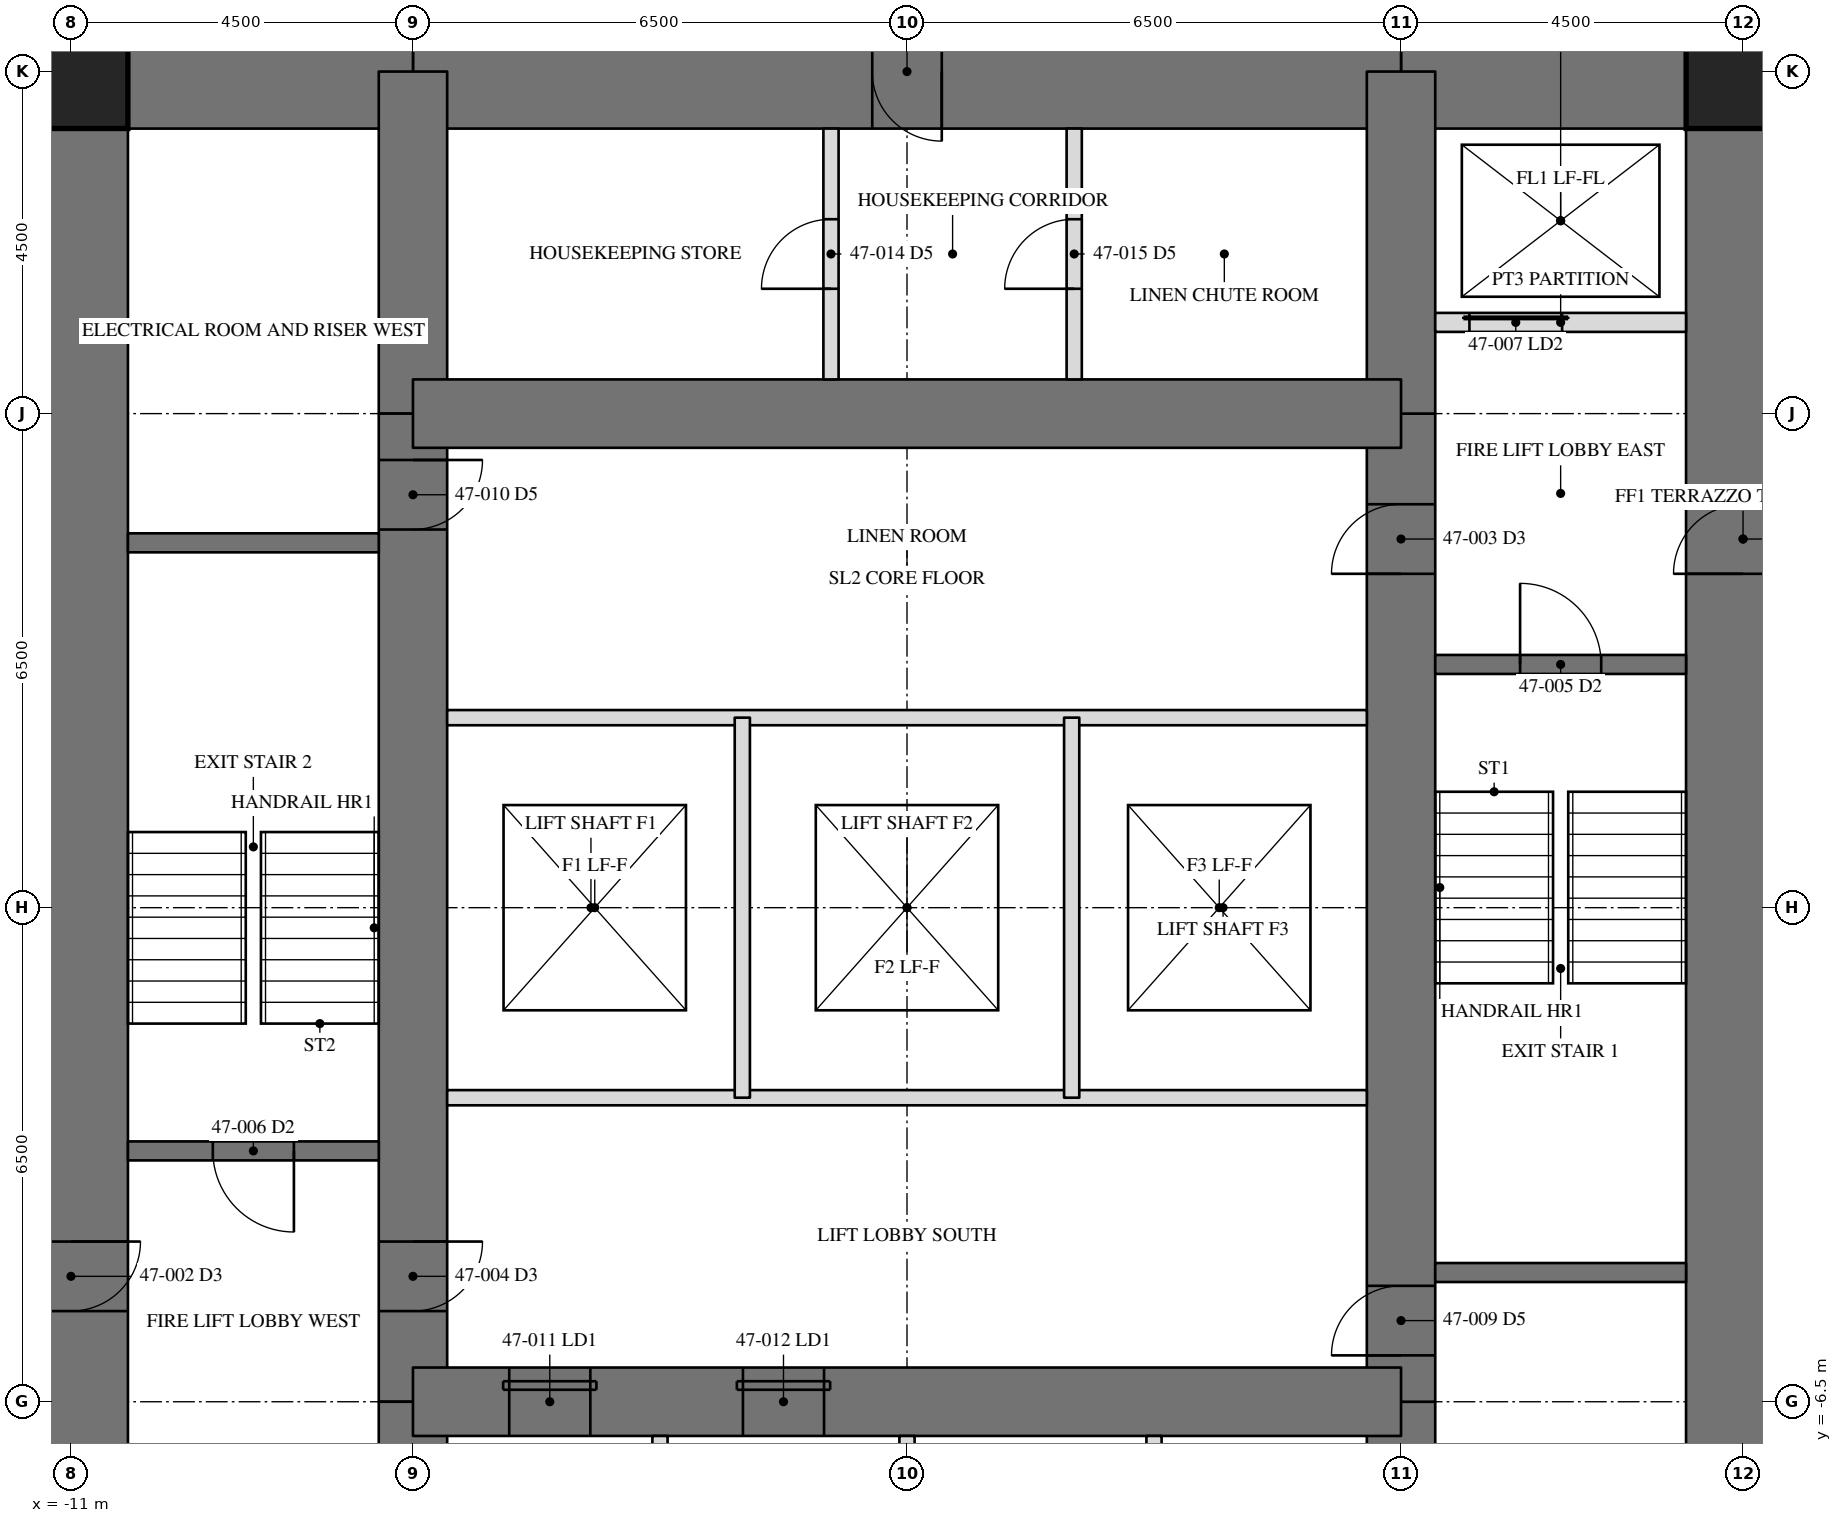
"""IFC4 building model, lengths in metres.
Left out: names, types, materials, properties, quantities, classifications, styles, units other than length and angle.
Written with IfcOpenShell. Run it as: python <this file> out.ifc"""

import sys

from ifc_helpers import new_model, si_unit, direction, frame, frame_2d, origin, origin_2d, place, context, subcontext, project, spatial, rectangle, hollow_rectangle, extrude, element, fill, save


model = new_model("IFC4")
c1 = context("Model", 3, precision=1e-05, world=origin(), true_north=direction((0.0, 1.0)))
c2 = subcontext(c1, "Body", "Model", "MODEL_VIEW")
j1 = project(units=[si_unit("LENGTHUNIT", "METRE"), si_unit("PLANEANGLEUNIT", "RADIAN")], contexts=[c1])
p1 = place(None, origin())
s1 = spatial("IfcSite", under=j1, at=p1, CompositionType="ELEMENT")
p2 = place(p1, origin())
s2 = spatial("IfcBuilding", under=s1, at=p2, CompositionType="ELEMENT")
p3 = place(p2, frame((0.0, 0.0, 201.2)))
s3 = spatial("IfcBuildingStorey", under=s2, at=p3, CompositionType="ELEMENT", Elevation=201.2)
p4 = place(p3, frame((11.0, -11.0, 0.0), z_axis=(0.0, 0.0, 1.0), x_axis=(0.0, 1.0, 0.0)))
e1 = element("IfcWall", 1, at=p4, inside=s3, PredefinedType="SHEAR", context=c2, shape_type="SweptSolid", body=[
    extrude(rectangle(XDim=22.0, YDim=1.5, at=frame_2d((11.0, 0.0))), origin(), (0.0, 0.0, 1.0), 3.5),
])
p5 = place(p4, frame((15.393, 0.0, 0.0)))
e2 = element("IfcOpeningElement", 2, at=p5, cuts=e1, PredefinedType="OPENING", context=c2, shape_type="SweptSolid", body=[
    extrude(rectangle(XDim=0.915, YDim=2.134, at=frame_2d((0.458, 1.067))), frame((0.0, 0.76, 0.0), z_axis=(0.0, -1.0, 0.0), x_axis=(1.0, 0.0, 0.0)), (0.0, 0.0, 1.0), 1.52),
])
p6 = place(p3, frame((-11.0, 11.0, 0.0), z_axis=(0.0, 0.0, 1.0), x_axis=(0.0, -1.0, 0.0)))
e3 = element("IfcWall", 3, at=p6, inside=s3, PredefinedType="SHEAR", context=c2, shape_type="SweptSolid", body=[
    extrude(rectangle(XDim=22.0, YDim=1.5, at=frame_2d((11.0, 0.0))), origin(), (0.0, 0.0, 1.0), 3.5),
])
p7 = place(p6, frame((15.393, 0.0, 0.0)))
e4 = element("IfcOpeningElement", 4, at=p7, cuts=e3, PredefinedType="OPENING", context=c2, shape_type="SweptSolid", body=[
    extrude(rectangle(XDim=0.915, YDim=2.134, at=frame_2d((0.458, 1.067))), frame((0.0, 0.76, 0.0), z_axis=(0.0, -1.0, 0.0), x_axis=(1.0, 0.0, 0.0)), (0.0, 0.0, 1.0), 1.52),
])
p8 = place(p3, frame((11.0, 11.0, 0.0), z_axis=(0.0, 0.0, 1.0), x_axis=(-1.0, 0.0, 0.0)))
e5 = element("IfcWall", 5, at=p8, inside=s3, PredefinedType="SHEAR", context=c2, shape_type="SweptSolid", body=[
    extrude(rectangle(XDim=4.5, YDim=1.5, at=frame_2d((2.25, 0.0))), origin(), (0.0, 0.0, 1.0), 3.5),
])
p9 = place(p3, frame((6.5, 11.0, 0.0), z_axis=(0.0, 0.0, 1.0), x_axis=(-1.0, 0.0, 0.0)))
e6 = element("IfcWall", 6, at=p9, inside=s3, PredefinedType="SHEAR", context=c2, shape_type="SweptSolid", body=[
    extrude(rectangle(XDim=13.0, YDim=1.5, at=frame_2d((6.5, 0.0))), origin(), (0.0, 0.0, 1.0), 3.5),
])
p10 = place(p9, frame((6.042, 0.0, 0.0)))
e7 = element("IfcOpeningElement", 7, at=p10, cuts=e6, PredefinedType="OPENING", context=c2, shape_type="SweptSolid", body=[
    extrude(rectangle(XDim=0.915, YDim=2.134, at=frame_2d((0.458, 1.067))), frame((0.0, 0.76, 0.0), z_axis=(0.0, -1.0, 0.0), x_axis=(1.0, 0.0, 0.0)), (0.0, 0.0, 1.0), 1.52),
])
p11 = place(p3, frame((-6.5, 11.0, 0.0), z_axis=(0.0, 0.0, 1.0), x_axis=(-1.0, 0.0, 0.0)))
e8 = element("IfcWall", 8, at=p11, inside=s3, PredefinedType="SHEAR", context=c2, shape_type="SweptSolid", body=[
    extrude(rectangle(XDim=4.5, YDim=1.5, at=frame_2d((2.25, 0.0))), origin(), (0.0, 0.0, 1.0), 3.5),
])
p12 = place(p3, frame((6.5, -11.0, 0.0), z_axis=(0.0, 0.0, 1.0), x_axis=(0.0, 1.0, 0.0)))
e9 = element("IfcWall", 9, at=p12, inside=s3, PredefinedType="SHEAR", context=c2, shape_type="SweptSolid", body=[
    extrude(rectangle(XDim=4.5, YDim=0.9, at=frame_2d((2.25, 0.0))), origin(), (0.0, 0.0, 1.0), 3.5),
])
p13 = place(p3, frame((6.5, -6.5, 0.0), z_axis=(0.0, 0.0, 1.0), x_axis=(0.0, 1.0, 0.0)))
e10 = element("IfcWall", 10, at=p13, inside=s3, PredefinedType="SHEAR", context=c2, shape_type="SweptSolid", body=[
    extrude(rectangle(XDim=13.0, YDim=0.9, at=frame_2d((6.5, 0.0))), origin(), (0.0, 0.0, 1.0), 3.5),
])
p14 = place(p13, frame((10.893, 0.0, 0.0)))
e11 = element("IfcOpeningElement", 11, at=p14, cuts=e10, PredefinedType="OPENING", context=c2, shape_type="SweptSolid", body=[
    extrude(rectangle(XDim=0.915, YDim=2.134, at=frame_2d((0.458, 1.067))), frame((0.0, 0.46, 0.0), z_axis=(0.0, -1.0, 0.0), x_axis=(1.0, 0.0, 0.0)), (0.0, 0.0, 1.0), 0.92),
])
p15 = place(p13, frame((0.61, 0.0, 0.0)))
e12 = element("IfcOpeningElement", 12, at=p15, cuts=e10, PredefinedType="OPENING", context=c2, shape_type="SweptSolid", body=[
    extrude(rectangle(XDim=0.915, YDim=2.134, at=frame_2d((0.458, 1.067))), frame((0.0, 0.46, 0.0), z_axis=(0.0, -1.0, 0.0), x_axis=(1.0, 0.0, 0.0)), (0.0, 0.0, 1.0), 0.92),
])
for number, where, z_axis, x_axis in (
    (13, (6.5, 6.5, 0.0), (0.0, 0.0, 1.0), (0.0, 1.0, 0.0)),
    (14, (-6.5, 11.0, 0.0), (0.0, 0.0, 1.0), (0.0, -1.0, 0.0)),
):
    element("IfcWall", number, at=place(p3, frame(where, z_axis=z_axis, x_axis=x_axis)), inside=s3, PredefinedType="SHEAR", context=c2, shape_type="SweptSolid", body=[
        extrude(rectangle(XDim=4.5, YDim=0.9, at=frame_2d((2.25, 0.0))), origin(), (0.0, 0.0, 1.0), 3.5),
    ])
p16 = place(p3, frame((-6.5, 6.5, 0.0), z_axis=(0.0, 0.0, 1.0), x_axis=(0.0, -1.0, 0.0)))
e15 = element("IfcWall", 15, at=p16, inside=s3, PredefinedType="SHEAR", context=c2, shape_type="SweptSolid", body=[
    extrude(rectangle(XDim=13.0, YDim=0.9, at=frame_2d((6.5, 0.0))), origin(), (0.0, 0.0, 1.0), 3.5),
])
p17 = place(p16, frame((10.893, 0.0, 0.0)))
e16 = element("IfcOpeningElement", 16, at=p17, cuts=e15, PredefinedType="OPENING", context=c2, shape_type="SweptSolid", body=[
    extrude(rectangle(XDim=0.915, YDim=2.134, at=frame_2d((0.458, 1.067))), frame((0.0, 0.46, 0.0), z_axis=(0.0, -1.0, 0.0), x_axis=(1.0, 0.0, 0.0)), (0.0, 0.0, 1.0), 0.92),
])
p18 = place(p16, frame((0.61, 0.0, 0.0)))
e17 = element("IfcOpeningElement", 17, at=p18, cuts=e15, PredefinedType="OPENING", context=c2, shape_type="SweptSolid", body=[
    extrude(rectangle(XDim=0.915, YDim=2.134, at=frame_2d((0.458, 1.067))), frame((0.0, 0.46, 0.0), z_axis=(0.0, -1.0, 0.0), x_axis=(1.0, 0.0, 0.0)), (0.0, 0.0, 1.0), 0.92),
])
p19 = place(p3, frame((-6.5, -6.5, 0.0), z_axis=(0.0, 0.0, 1.0), x_axis=(0.0, -1.0, 0.0)))
e18 = element("IfcWall", 18, at=p19, inside=s3, PredefinedType="SHEAR", context=c2, shape_type="SweptSolid", body=[
    extrude(rectangle(XDim=4.5, YDim=0.9, at=frame_2d((2.25, 0.0))), origin(), (0.0, 0.0, 1.0), 3.5),
])
p20 = place(p3, frame((6.5, 6.5, 0.0), z_axis=(0.0, 0.0, 1.0), x_axis=(-1.0, 0.0, 0.0)))
e19 = element("IfcWall", 19, at=p20, inside=s3, PredefinedType="SHEAR", context=c2, shape_type="SweptSolid", body=[
    extrude(rectangle(XDim=13.0, YDim=0.9, at=frame_2d((6.5, 0.0))), origin(), (0.0, 0.0, 1.0), 3.5),
])
p21 = place(p3, frame((-6.5, -6.5, 0.0), z_axis=(0.0, 0.0, 1.0), x_axis=(1.0, 0.0, 0.0)))
e20 = element("IfcWall", 20, at=p21, inside=s3, PredefinedType="SHEAR", context=c2, shape_type="SweptSolid", body=[
    extrude(rectangle(XDim=13.0, YDim=0.9, at=frame_2d((6.5, 0.0))), origin(), (0.0, 0.0, 1.0), 3.5),
])
p22 = place(p21, frame((1.267, 0.0, 0.0)))
e21 = element("IfcOpeningElement", 21, at=p22, cuts=e20, PredefinedType="OPENING", context=c2, shape_type="SweptSolid", body=[
    extrude(rectangle(XDim=1.067, YDim=2.134, at=frame_2d((0.533, 1.067))), frame((0.0, 0.46, 0.0), z_axis=(0.0, -1.0, 0.0), x_axis=(1.0, 0.0, 0.0)), (0.0, 0.0, 1.0), 0.92),
])
p23 = place(p21, frame((4.342, 0.0, 0.0)))
e22 = element("IfcOpeningElement", 22, at=p23, cuts=e20, PredefinedType="OPENING", context=c2, shape_type="SweptSolid", body=[
    extrude(rectangle(XDim=1.067, YDim=2.134, at=frame_2d((0.533, 1.067))), frame((0.0, 0.46, 0.0), z_axis=(0.0, -1.0, 0.0), x_axis=(1.0, 0.0, 0.0)), (0.0, 0.0, 1.0), 0.92),
])
for number, where, z_axis, x_axis in (
    (23, (11.0, 11.0, 0.0), (0.0, 0.0, 1.0), (1.0, 0.0, 0.0)),
    (24, (-11.0, 11.0, 0.0), (0.0, 0.0, 1.0), (1.0, 0.0, 0.0)),
):
    element("IfcColumn", number, at=place(p3, frame(where, z_axis=z_axis, x_axis=x_axis)), inside=s3, PredefinedType="COLUMN", context=c2, shape_type="SweptSolid", body=[
        extrude(hollow_rectangle(XDim=1.499, YDim=1.499, WallThickness=0.102, at=origin_2d()), origin(), (0.0, 0.0, 1.0), 3.5),
    ])
for number, where, z_axis, x_axis in (
    (25, (6.95, -4.8, 0.0), (0.0, 0.0, 1.0), (1.0, 0.0, 0.0)),
    (26, (-6.95, 4.8, 0.0), (0.0, 0.0, 1.0), (-1.0, 0.0, 0.0)),
):
    element("IfcWall", number, at=place(p3, frame(where, z_axis=z_axis, x_axis=x_axis)), inside=s3, PredefinedType="SOLIDWALL", context=c2, shape_type="SweptSolid", body=[
        extrude(rectangle(XDim=3.3, YDim=0.25, at=frame_2d((1.65, 0.0))), origin(), (0.0, 0.0, 1.0), 3.31),
    ])
p24 = place(p3, frame((6.95, 3.2, 0.0), z_axis=(0.0, 0.0, 1.0), x_axis=(1.0, 0.0, 0.0)))
e27 = element("IfcWall", 27, at=p24, inside=s3, PredefinedType="SOLIDWALL", context=c2, shape_type="SweptSolid", body=[
    extrude(rectangle(XDim=3.3, YDim=0.25, at=frame_2d((1.65, 0.0))), origin(), (0.0, 0.0, 1.0), 3.31),
])
p25 = place(p24, frame((1.116, 0.0, 0.0)))
e28 = element("IfcOpeningElement", 28, at=p25, cuts=e27, PredefinedType="OPENING", context=c2, shape_type="SweptSolid", body=[
    extrude(rectangle(XDim=1.067, YDim=2.134, at=frame_2d((0.533, 1.067))), frame((0.0, 0.135, 0.0), z_axis=(0.0, -1.0, 0.0), x_axis=(1.0, 0.0, 0.0)), (0.0, 0.0, 1.0), 0.27),
])
p26 = place(p3, frame((-6.95, -3.2, 0.0), z_axis=(0.0, 0.0, 1.0), x_axis=(-1.0, 0.0, 0.0)))
e29 = element("IfcWall", 29, at=p26, inside=s3, PredefinedType="SOLIDWALL", context=c2, shape_type="SweptSolid", body=[
    extrude(rectangle(XDim=3.3, YDim=0.25, at=frame_2d((1.65, 0.0))), origin(), (0.0, 0.0, 1.0), 3.31),
])
p27 = place(p26, frame((1.116, 0.0, 0.0)))
e30 = element("IfcOpeningElement", 30, at=p27, cuts=e29, PredefinedType="OPENING", context=c2, shape_type="SweptSolid", body=[
    extrude(rectangle(XDim=1.067, YDim=2.134, at=frame_2d((0.533, 1.067))), frame((0.0, 0.135, 0.0), z_axis=(0.0, -1.0, 0.0), x_axis=(1.0, 0.0, 0.0)), (0.0, 0.0, 1.0), 0.27),
])
p28 = place(p3, frame((6.95, 7.7, 0.0), z_axis=(0.0, 0.0, 1.0), x_axis=(1.0, 0.0, 0.0)))
e31 = element("IfcWall", 31, at=p28, inside=s3, PredefinedType="PARTITIONING", context=c2, shape_type="SweptSolid", body=[
    extrude(rectangle(XDim=3.3, YDim=0.25, at=frame_2d((1.65, 0.0))), origin(), (0.0, 0.0, 1.0), 3.31),
])
p29 = place(p28, frame((0.45, 0.0, 0.0)))
e32 = element("IfcOpeningElement", 32, at=p29, cuts=e31, PredefinedType="OPENING", context=c2, shape_type="SweptSolid", body=[
    extrude(rectangle(XDim=1.219, YDim=2.134, at=frame_2d((0.609, 1.067))), frame((0.0, 0.135, 0.0), z_axis=(0.0, -1.0, 0.0), x_axis=(1.0, 0.0, 0.0)), (0.0, 0.0, 1.0), 0.27),
])
for number, where, z_axis, x_axis in (
    (33, (-6.05, 2.5, 0.0), (0.0, 0.0, 1.0), (1.0, 0.0, 0.0)),
    (34, (6.05, -2.5, 0.0), (0.0, 0.0, 1.0), (-1.0, 0.0, 0.0)),
):
    element("IfcWall", number, at=place(p3, frame(where, z_axis=z_axis, x_axis=x_axis)), inside=s3, PredefinedType="PARTITIONING", context=c2, shape_type="SweptSolid", body=[
        extrude(rectangle(XDim=12.1, YDim=0.2, at=frame_2d((6.05, 0.0))), origin(), (0.0, 0.0, 1.0), 3.31),
    ])
for number, where, z_axis, x_axis in (
    (35, (-3.25, -10.25, 0.0), (0.0, 0.0, 1.0), (0.0, 1.0, 0.0)),
    (36, (0.0, -10.25, 0.0), (0.0, 0.0, 1.0), (0.0, 1.0, 0.0)),
    (37, (3.25, -10.25, 0.0), (0.0, 0.0, 1.0), (0.0, 1.0, 0.0)),
):
    element("IfcWall", number, at=place(p3, frame(where, z_axis=z_axis, x_axis=x_axis)), inside=s3, PredefinedType="PARTITIONING", context=c2, shape_type="SweptSolid", body=[
        extrude(rectangle(XDim=3.3, YDim=0.2, at=frame_2d((1.65, 0.0))), origin(), (0.0, 0.0, 1.0), 3.31),
    ])
for number, where, z_axis, x_axis in (
    (38, (-2.167, -2.5, 0.0), (0.0, 0.0, 1.0), (0.0, 1.0, 0.0)),
    (39, (2.167, -2.5, 0.0), (0.0, 0.0, 1.0), (0.0, 1.0, 0.0)),
):
    element("IfcWall", number, at=place(p3, frame(where, z_axis=z_axis, x_axis=x_axis)), inside=s3, PredefinedType="PARTITIONING", context=c2, shape_type="SweptSolid", body=[
        extrude(rectangle(XDim=5.0, YDim=0.2, at=frame_2d((2.5, 0.0))), origin(), (0.0, 0.0, 1.0), 3.31),
    ])
p30 = place(p3, frame((-1.0, 6.95, 0.0), z_axis=(0.0, 0.0, 1.0), x_axis=(0.0, 1.0, 0.0)))
e40 = element("IfcWall", 40, at=p30, inside=s3, PredefinedType="PARTITIONING", context=c2, shape_type="SweptSolid", body=[
    extrude(rectangle(XDim=3.3, YDim=0.2, at=frame_2d((1.65, 0.0))), origin(), (0.0, 0.0, 1.0), 3.31),
])
p31 = place(p30, frame((1.192, 0.0, 0.0)))
e41 = element("IfcOpeningElement", 41, at=p31, cuts=e40, PredefinedType="OPENING", context=c2, shape_type="SweptSolid", body=[
    extrude(rectangle(XDim=0.915, YDim=2.134, at=frame_2d((0.458, 1.067))), frame((0.0, 0.11, 0.0), z_axis=(0.0, -1.0, 0.0), x_axis=(1.0, 0.0, 0.0)), (0.0, 0.0, 1.0), 0.22),
])
p32 = place(p3, frame((2.2, 6.95, 0.0), z_axis=(0.0, 0.0, 1.0), x_axis=(0.0, 1.0, 0.0)))
e42 = element("IfcWall", 42, at=p32, inside=s3, PredefinedType="PARTITIONING", context=c2, shape_type="SweptSolid", body=[
    extrude(rectangle(XDim=3.3, YDim=0.2, at=frame_2d((1.65, 0.0))), origin(), (0.0, 0.0, 1.0), 3.31),
])
p33 = place(p32, frame((1.192, 0.0, 0.0)))
e43 = element("IfcOpeningElement", 43, at=p33, cuts=e42, PredefinedType="OPENING", context=c2, shape_type="SweptSolid", body=[
    extrude(rectangle(XDim=0.915, YDim=2.134, at=frame_2d((0.458, 1.067))), frame((0.0, 0.11, 0.0), z_axis=(0.0, -1.0, 0.0), x_axis=(1.0, 0.0, 0.0)), (0.0, 0.0, 1.0), 0.22),
])
p34 = place(p14, origin())
e44 = element("IfcDoor", 44, at=p34, inside=s3, OperationType="SINGLE_SWING_RIGHT", PredefinedType="DOOR", context=c2, shape_type="SweptSolid", body=[
    extrude(rectangle(XDim=0.915, YDim=2.134, at=frame_2d((0.458, 1.067))), frame((0.0, -0.375, 0.0), z_axis=(0.0, -1.0, 0.0), x_axis=(1.0, 0.0, 0.0)), (0.0, 0.0, 1.0), 0.05),
])
fill(e11, e44)
p35 = place(p17, origin())
e45 = element("IfcDoor", 45, at=p35, inside=s3, OperationType="SINGLE_SWING_RIGHT", PredefinedType="DOOR", context=c2, shape_type="SweptSolid", body=[
    extrude(rectangle(XDim=0.915, YDim=2.134, at=frame_2d((0.458, 1.067))), frame((0.0, -0.375, 0.0), z_axis=(0.0, -1.0, 0.0), x_axis=(1.0, 0.0, 0.0)), (0.0, 0.0, 1.0), 0.05),
])
fill(e16, e45)
p36 = place(p25, origin())
e46 = element("IfcDoor", 46, at=p36, inside=s3, OperationType="SINGLE_SWING_LEFT", PredefinedType="DOOR", context=c2, shape_type="SweptSolid", body=[
    extrude(rectangle(XDim=1.067, YDim=2.134, at=frame_2d((0.533, 1.067))), frame((0.0, 0.025, 0.0), z_axis=(0.0, -1.0, 0.0), x_axis=(1.0, 0.0, 0.0)), (0.0, 0.0, 1.0), 0.05),
])
fill(e28, e46)
p37 = place(p27, origin())
e47 = element("IfcDoor", 47, at=p37, inside=s3, OperationType="SINGLE_SWING_LEFT", PredefinedType="DOOR", context=c2, shape_type="SweptSolid", body=[
    extrude(rectangle(XDim=1.067, YDim=2.134, at=frame_2d((0.533, 1.067))), frame((0.0, 0.025, 0.0), z_axis=(0.0, -1.0, 0.0), x_axis=(1.0, 0.0, 0.0)), (0.0, 0.0, 1.0), 0.05),
])
fill(e30, e47)
p38 = place(p29, origin())
e48 = element("IfcDoor", 48, at=p38, inside=s3, OperationType="SLIDING_TO_LEFT", PredefinedType="DOOR", context=c2, shape_type="SweptSolid", body=[
    extrude(rectangle(XDim=1.219, YDim=2.134, at=frame_2d((0.609, 1.067))), frame((0.0, 0.025, 0.0), z_axis=(0.0, -1.0, 0.0), x_axis=(1.0, 0.0, 0.0)), (0.0, 0.0, 1.0), 0.05),
])
fill(e32, e48)
p39 = place(p15, origin())
e49 = element("IfcDoor", 49, at=p39, inside=s3, OperationType="SINGLE_SWING_RIGHT", PredefinedType="DOOR", context=c2, shape_type="SweptSolid", body=[
    extrude(rectangle(XDim=0.915, YDim=2.134, at=frame_2d((0.458, 1.067))), frame((0.0, -0.375, 0.0), z_axis=(0.0, -1.0, 0.0), x_axis=(1.0, 0.0, 0.0)), (0.0, 0.0, 1.0), 0.05),
])
fill(e12, e49)
p40 = place(p18, origin())
e50 = element("IfcDoor", 50, at=p40, inside=s3, OperationType="SINGLE_SWING_RIGHT", PredefinedType="DOOR", context=c2, shape_type="SweptSolid", body=[
    extrude(rectangle(XDim=0.915, YDim=2.134, at=frame_2d((0.458, 1.067))), frame((0.0, -0.375, 0.0), z_axis=(0.0, -1.0, 0.0), x_axis=(1.0, 0.0, 0.0)), (0.0, 0.0, 1.0), 0.05),
])
fill(e17, e50)
p41 = place(p22, origin())
e51 = element("IfcDoor", 51, at=p41, inside=s3, OperationType="SLIDING_TO_LEFT", PredefinedType="DOOR", context=c2, shape_type="SweptSolid", body=[
    extrude(rectangle(XDim=1.067, YDim=2.134, at=frame_2d((0.533, 1.067))), frame((0.0, -0.375, 0.0), z_axis=(0.0, -1.0, 0.0), x_axis=(1.0, 0.0, 0.0)), (0.0, 0.0, 1.0), 0.05),
])
fill(e21, e51)
p42 = place(p23, origin())
e52 = element("IfcDoor", 52, at=p42, inside=s3, OperationType="SLIDING_TO_LEFT", PredefinedType="DOOR", context=c2, shape_type="SweptSolid", body=[
    extrude(rectangle(XDim=1.067, YDim=2.134, at=frame_2d((0.533, 1.067))), frame((0.0, -0.375, 0.0), z_axis=(0.0, -1.0, 0.0), x_axis=(1.0, 0.0, 0.0)), (0.0, 0.0, 1.0), 0.05),
])
fill(e22, e52)
p43 = place(p10, origin())
e53 = element("IfcDoor", 53, at=p43, inside=s3, OperationType="SINGLE_SWING_RIGHT", PredefinedType="DOOR", context=c2, shape_type="SweptSolid", body=[
    extrude(rectangle(XDim=0.915, YDim=2.134, at=frame_2d((0.458, 1.067))), frame((0.0, 0.025, 0.0), z_axis=(0.0, -1.0, 0.0), x_axis=(1.0, 0.0, 0.0)), (0.0, 0.0, 1.0), 0.05),
])
fill(e7, e53)
p44 = place(p31, origin())
e54 = element("IfcDoor", 54, at=p44, inside=s3, OperationType="SINGLE_SWING_RIGHT", PredefinedType="DOOR", context=c2, shape_type="SweptSolid", body=[
    extrude(rectangle(XDim=0.915, YDim=2.134, at=frame_2d((0.458, 1.067))), frame((0.0, 0.025, 0.0), z_axis=(0.0, -1.0, 0.0), x_axis=(1.0, 0.0, 0.0)), (0.0, 0.0, 1.0), 0.05),
])
fill(e41, e54)
p45 = place(p33, origin())
e55 = element("IfcDoor", 55, at=p45, inside=s3, OperationType="SINGLE_SWING_RIGHT", PredefinedType="DOOR", context=c2, shape_type="SweptSolid", body=[
    extrude(rectangle(XDim=0.915, YDim=2.134, at=frame_2d((0.458, 1.067))), frame((0.0, 0.025, 0.0), z_axis=(0.0, -1.0, 0.0), x_axis=(1.0, 0.0, 0.0)), (0.0, 0.0, 1.0), 0.05),
])
fill(e43, e55)
save(model, sys.argv[1])
